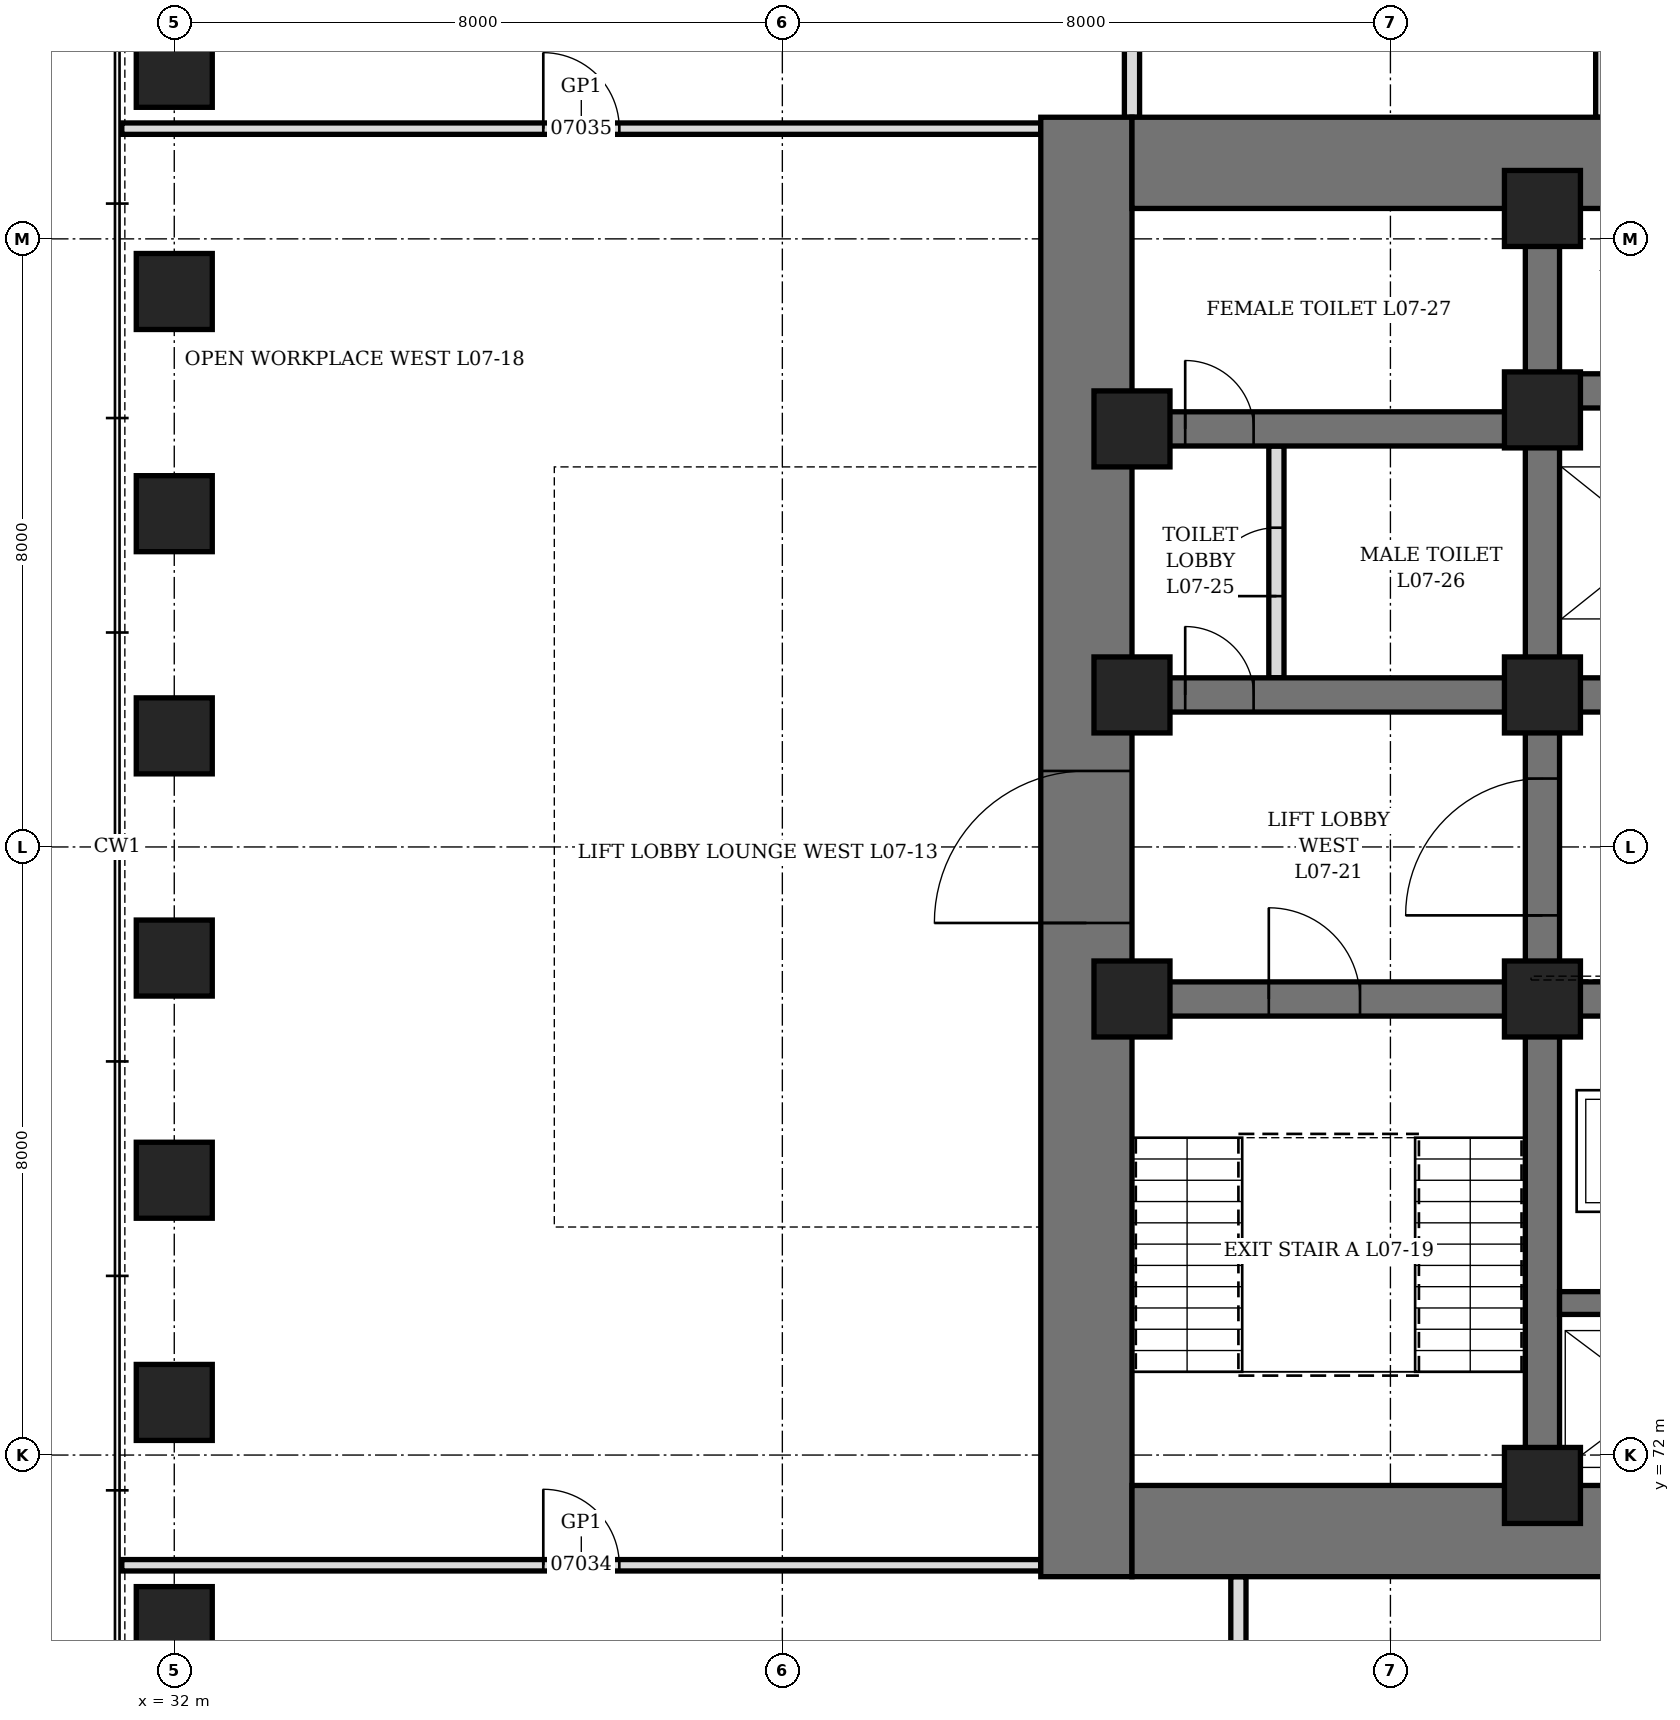
"""IFC4 building model, lengths in metres.
Left out: names, types, materials, properties, quantities, classifications, styles, units other than length and angle.
Written with IfcOpenShell. Run it as: python <this file> out.ifc"""

import sys

from ifc_helpers import new_model, si_unit, direction, frame, frame_2d, origin, origin_2d, place, context, subcontext, project, spatial, rectangle, hollow_rectangle, extrude, element, fill, save


model = new_model("IFC4")
c1 = context("Model", 3, precision=1e-05, world=origin(), true_north=direction((0.0, 1.0)))
c2 = subcontext(c1, "Body", "Model", "MODEL_VIEW")
j1 = project(units=[si_unit("LENGTHUNIT", "METRE"), si_unit("PLANEANGLEUNIT", "RADIAN")], contexts=[c1])
p1 = place(None, origin())
s1 = spatial("IfcSite", under=j1, at=p1, CompositionType="ELEMENT")
p2 = place(p1, origin())
s2 = spatial("IfcBuilding", under=s1, at=p2, CompositionType="ELEMENT")
p3 = place(p2, frame((0.0, 0.0, 39.1)))
s3 = spatial("IfcBuildingStorey", under=s2, at=p3, CompositionType="ELEMENT", Elevation=39.1)
for number, where, z_axis, x_axis in (
    (1, (32.0, 90.231, 0.0), (0.0, 0.0, 1.0), (0.0, 1.0, 0.0)),
    (2, (32.0, 87.308, 0.0), (0.0, 0.0, 1.0), (0.0, 1.0, 0.0)),
    (3, (32.0, 84.385, 0.0), (0.0, 0.0, 1.0), (0.0, 1.0, 0.0)),
    (4, (32.0, 81.461, 0.0), (0.0, 0.0, 1.0), (0.0, 1.0, 0.0)),
    (5, (32.0, 78.539, 0.0), (0.0, 0.0, 1.0), (0.0, 1.0, 0.0)),
    (6, (32.0, 75.615, 0.0), (0.0, 0.0, 1.0), (0.0, 1.0, 0.0)),
    (7, (32.0, 72.692, 0.0), (0.0, 0.0, 1.0), (0.0, 1.0, 0.0)),
    (8, (32.0, 69.769, 0.0), (0.0, 0.0, 1.0), (0.0, 1.0, 0.0)),
):
    element("IfcColumn", number, at=place(p3, frame(where, z_axis=z_axis, x_axis=x_axis)), inside=s3, PredefinedType="COLUMN", context=c2, shape_type="SweptSolid", body=[
        extrude(hollow_rectangle(XDim=1.0, YDim=1.0, WallThickness=0.35, at=origin_2d()), origin(), (0.0, 0.0, 1.0), 4.2),
    ])
p4 = place(p3, frame((44.0, 70.4, 0.0), z_axis=(0.0, 0.0, 1.0), x_axis=(0.0, 1.0, 0.0)))
e9 = element("IfcWall", 9, at=p4, inside=s3, PredefinedType="SHEAR", context=c2, shape_type="SweptSolid", body=[
    extrude(rectangle(XDim=19.2, YDim=1.2, at=frame_2d((9.6, 0.0))), origin(), (0.0, 0.0, 1.0), 4.2),
])
p5 = place(p4, frame((8.6, 0.0, 0.0)))
e10 = element("IfcOpeningElement", 10, at=p5, cuts=e9, PredefinedType="OPENING", context=c2, shape_type="SweptSolid", body=[
    extrude(rectangle(XDim=2.0, YDim=2.4, at=frame_2d((1.0, 1.2))), frame((0.0, 0.61, 0.0), z_axis=(0.0, -1.0, 0.0), x_axis=(1.0, 0.0, 0.0)), (0.0, 0.0, 1.0), 1.22),
])
p6 = place(p3, frame((44.6, 71.0, 0.0), z_axis=(0.0, 0.0, 1.0), x_axis=(1.0, 0.0, 0.0)))
e11 = element("IfcWall", 11, at=p6, inside=s3, PredefinedType="SHEAR", context=c2, shape_type="SweptSolid", body=[
    extrude(rectangle(XDim=22.8, YDim=1.2, at=frame_2d((11.4, 0.0))), origin(), (0.0, 0.0, 1.0), 4.2),
])
p7 = place(p3, frame((44.6, 89.0, 0.0), z_axis=(0.0, 0.0, 1.0), x_axis=(1.0, 0.0, 0.0)))
e12 = element("IfcWall", 12, at=p7, inside=s3, PredefinedType="SHEAR", context=c2, shape_type="SweptSolid", body=[
    extrude(rectangle(XDim=22.8, YDim=1.2, at=frame_2d((11.4, 0.0))), origin(), (0.0, 0.0, 1.0), 4.2),
])
p8 = place(p7, frame((6.525, 0.0, 0.0)))
e13 = element("IfcOpeningElement", 13, at=p8, cuts=e12, PredefinedType="OPENING", context=c2, shape_type="SweptSolid", body=[
    extrude(rectangle(XDim=1.0, YDim=2.1, at=frame_2d((0.5, 1.05))), frame((0.0, 0.61, 0.0), z_axis=(0.0, -1.0, 0.0), x_axis=(1.0, 0.0, 0.0)), (0.0, 0.0, 1.0), 1.22),
])
p9 = place(p7, frame((9.45, 0.0, 0.0)))
e14 = element("IfcOpeningElement", 14, at=p9, cuts=e12, PredefinedType="OPENING", context=c2, shape_type="SweptSolid", body=[
    extrude(rectangle(XDim=0.9, YDim=2.1, at=frame_2d((0.45, 1.05))), frame((0.0, 0.61, 0.0), z_axis=(0.0, -1.0, 0.0), x_axis=(1.0, 0.0, 0.0)), (0.0, 0.0, 1.0), 1.22),
])
p10 = place(p7, frame((12.025, 0.0, 0.0)))
e15 = element("IfcOpeningElement", 15, at=p10, cuts=e12, PredefinedType="OPENING", context=c2, shape_type="SweptSolid", body=[
    extrude(rectangle(XDim=0.9, YDim=2.1, at=frame_2d((0.45, 1.05))), frame((0.0, 0.61, 0.0), z_axis=(0.0, -1.0, 0.0), x_axis=(1.0, 0.0, 0.0)), (0.0, 0.0, 1.0), 1.22),
])
p11 = place(p7, frame((13.962, 0.0, 0.0)))
e16 = element("IfcOpeningElement", 16, at=p11, cuts=e12, PredefinedType="OPENING", context=c2, shape_type="SweptSolid", body=[
    extrude(rectangle(XDim=0.9, YDim=2.1, at=frame_2d((0.45, 1.05))), frame((0.0, 0.61, 0.0), z_axis=(0.0, -1.0, 0.0), x_axis=(1.0, 0.0, 0.0)), (0.0, 0.0, 1.0), 1.22),
])
p12 = place(p3, frame((50.0, 71.6, 0.0), z_axis=(0.0, 0.0, 1.0), x_axis=(0.0, 1.0, 0.0)))
e17 = element("IfcWall", 17, at=p12, inside=s3, PredefinedType="SHEAR", context=c2, shape_type="SweptSolid", body=[
    extrude(rectangle(XDim=16.8, YDim=0.45, at=frame_2d((8.4, 0.0))), origin(), (0.0, 0.0, 1.0), 4.2),
])
p13 = place(p12, frame((7.5, 0.0, 0.0)))
e18 = element("IfcOpeningElement", 18, at=p13, cuts=e17, PredefinedType="OPENING", context=c2, shape_type="SweptSolid", body=[
    extrude(rectangle(XDim=1.8, YDim=2.4, at=frame_2d((0.9, 1.2))), frame((0.0, 0.235, 0.0), z_axis=(0.0, -1.0, 0.0), x_axis=(1.0, 0.0, 0.0)), (0.0, 0.0, 1.0), 0.47),
])
p14 = place(p3, frame((44.6, 78.0, 0.0), z_axis=(0.0, 0.0, 1.0), x_axis=(1.0, 0.0, 0.0)))
e19 = element("IfcWall", 19, at=p14, inside=s3, PredefinedType="SHEAR", context=c2, shape_type="SweptSolid", body=[
    extrude(rectangle(XDim=5.175, YDim=0.45, at=frame_2d((2.587, 0.0))), origin(), (0.0, 0.0, 1.0), 4.2),
])
p15 = place(p14, frame((1.8, 0.0, 0.0)))
e20 = element("IfcOpeningElement", 20, at=p15, cuts=e19, PredefinedType="OPENING", context=c2, shape_type="SweptSolid", body=[
    extrude(rectangle(XDim=1.2, YDim=2.1, at=frame_2d((0.6, 1.05))), frame((0.0, 0.235, 0.0), z_axis=(0.0, -1.0, 0.0), x_axis=(1.0, 0.0, 0.0)), (0.0, 0.0, 1.0), 0.47),
])
p16 = place(p3, frame((44.6, 82.0, 0.0), z_axis=(0.0, 0.0, 1.0), x_axis=(1.0, 0.0, 0.0)))
e21 = element("IfcWall", 21, at=p16, inside=s3, PredefinedType="SHEAR", context=c2, shape_type="SweptSolid", body=[
    extrude(rectangle(XDim=5.175, YDim=0.45, at=frame_2d((2.587, 0.0))), origin(), (0.0, 0.0, 1.0), 4.2),
])
p17 = place(p16, frame((0.7, 0.0, 0.0)))
e22 = element("IfcOpeningElement", 22, at=p17, cuts=e21, PredefinedType="OPENING", context=c2, shape_type="SweptSolid", body=[
    extrude(rectangle(XDim=0.9, YDim=2.1, at=frame_2d((0.45, 1.05))), frame((0.0, 0.235, 0.0), z_axis=(0.0, -1.0, 0.0), x_axis=(1.0, 0.0, 0.0)), (0.0, 0.0, 1.0), 0.47),
])
p18 = place(p3, frame((44.6, 85.5, 0.0), z_axis=(0.0, 0.0, 1.0), x_axis=(1.0, 0.0, 0.0)))
e23 = element("IfcWall", 23, at=p18, inside=s3, PredefinedType="SHEAR", context=c2, shape_type="SweptSolid", body=[
    extrude(rectangle(XDim=5.175, YDim=0.45, at=frame_2d((2.587, 0.0))), origin(), (0.0, 0.0, 1.0), 4.2),
])
p19 = place(p18, frame((0.7, 0.0, 0.0)))
e24 = element("IfcOpeningElement", 24, at=p19, cuts=e23, PredefinedType="OPENING", context=c2, shape_type="SweptSolid", body=[
    extrude(rectangle(XDim=0.9, YDim=2.1, at=frame_2d((0.45, 1.05))), frame((0.0, 0.235, 0.0), z_axis=(0.0, -1.0, 0.0), x_axis=(1.0, 0.0, 0.0)), (0.0, 0.0, 1.0), 0.47),
])
p20 = place(p3, frame((50.225, 78.0, 0.0), z_axis=(0.0, 0.0, 1.0), x_axis=(1.0, 0.0, 0.0)))
e25 = element("IfcWall", 25, at=p20, inside=s3, PredefinedType="SHEAR", context=c2, shape_type="SweptSolid", body=[
    extrude(rectangle(XDim=11.55, YDim=0.45, at=frame_2d((5.775, 0.0))), origin(), (0.0, 0.0, 1.0), 4.2),
])
p21 = place(p20, frame((0.725, 0.0, 0.0)))
e26 = element("IfcOpeningElement", 26, at=p21, cuts=e25, PredefinedType="OPENING", context=c2, shape_type="SweptSolid", body=[
    extrude(rectangle(XDim=1.1, YDim=2.2, at=frame_2d((0.55, 1.1))), frame((0.0, 0.235, 0.0), z_axis=(0.0, -1.0, 0.0), x_axis=(1.0, 0.0, 0.0)), (0.0, 0.0, 1.0), 0.47),
])
p22 = place(p20, frame((3.725, 0.0, 0.0)))
e27 = element("IfcOpeningElement", 27, at=p22, cuts=e25, PredefinedType="OPENING", context=c2, shape_type="SweptSolid", body=[
    extrude(rectangle(XDim=1.1, YDim=2.2, at=frame_2d((0.55, 1.1))), frame((0.0, 0.235, 0.0), z_axis=(0.0, -1.0, 0.0), x_axis=(1.0, 0.0, 0.0)), (0.0, 0.0, 1.0), 0.47),
])
p23 = place(p20, frame((6.725, 0.0, 0.0)))
e28 = element("IfcOpeningElement", 28, at=p23, cuts=e25, PredefinedType="OPENING", context=c2, shape_type="SweptSolid", body=[
    extrude(rectangle(XDim=1.1, YDim=2.2, at=frame_2d((0.55, 1.1))), frame((0.0, 0.235, 0.0), z_axis=(0.0, -1.0, 0.0), x_axis=(1.0, 0.0, 0.0)), (0.0, 0.0, 1.0), 0.47),
])
p24 = place(p20, frame((9.725, 0.0, 0.0)))
e29 = element("IfcOpeningElement", 29, at=p24, cuts=e25, PredefinedType="OPENING", context=c2, shape_type="SweptSolid", body=[
    extrude(rectangle(XDim=1.1, YDim=2.2, at=frame_2d((0.55, 1.1))), frame((0.0, 0.235, 0.0), z_axis=(0.0, -1.0, 0.0), x_axis=(1.0, 0.0, 0.0)), (0.0, 0.0, 1.0), 0.47),
])
for number, where, z_axis, x_axis in (
    (30, (50.225, 82.0, 0.0), (0.0, 0.0, 1.0), (1.0, 0.0, 0.0)),
    (31, (50.225, 86.0, 0.0), (0.0, 0.0, 1.0), (1.0, 0.0, 0.0)),
):
    element("IfcWall", number, at=place(p3, frame(where, z_axis=z_axis, x_axis=x_axis)), inside=s3, PredefinedType="SHEAR", context=c2, shape_type="SweptSolid", body=[
        extrude(rectangle(XDim=11.55, YDim=0.45, at=frame_2d((5.775, 0.0))), origin(), (0.0, 0.0, 1.0), 4.2),
    ])
p25 = place(p3, frame((50.225, 74.0, 0.0), z_axis=(0.0, 0.0, 1.0), x_axis=(1.0, 0.0, 0.0)))
e32 = element("IfcWall", 32, at=p25, inside=s3, PredefinedType="SHEAR", context=c2, shape_type="SweptSolid", body=[
    extrude(rectangle(XDim=11.55, YDim=0.3, at=frame_2d((5.775, 0.0))), origin(), (0.0, 0.0, 1.0), 4.2),
])
for number, where, z_axis, x_axis in (
    (33, (44.6, 78.0, 0.0), (0.0, 0.0, 1.0), (1.0, 0.0, 0.0)),
    (34, (44.6, 82.0, 0.0), (0.0, 0.0, 1.0), (1.0, 0.0, 0.0)),
    (35, (44.6, 85.5, 0.0), (0.0, 0.0, 1.0), (1.0, 0.0, 0.0)),
    (36, (50.0, 71.6, 0.0), (0.0, 0.0, 1.0), (1.0, 0.0, 0.0)),
    (37, (50.0, 78.0, 0.0), (0.0, 0.0, 1.0), (1.0, 0.0, 0.0)),
    (38, (50.0, 82.0, 0.0), (0.0, 0.0, 1.0), (1.0, 0.0, 0.0)),
    (39, (50.0, 85.75, 0.0), (0.0, 0.0, 1.0), (1.0, 0.0, 0.0)),
    (40, (50.0, 88.4, 0.0), (0.0, 0.0, 1.0), (1.0, 0.0, 0.0)),
):
    element("IfcColumn", number, at=place(p3, frame(where, z_axis=z_axis, x_axis=x_axis)), inside=s3, PredefinedType="COLUMN", context=c2, shape_type="SweptSolid", body=[
        extrude(hollow_rectangle(XDim=1.0, YDim=1.0, WallThickness=0.15, at=origin_2d()), origin(), (0.0, 0.0, 1.0), 4.2),
    ])
p26 = place(p3, frame((46.5, 82.225, 0.0), z_axis=(0.0, 0.0, 1.0), x_axis=(0.0, 1.0, 0.0)))
e41 = element("IfcWall", 41, at=p26, inside=s3, PredefinedType="PARTITIONING", context=c2, shape_type="SweptSolid", body=[
    extrude(rectangle(XDim=3.05, YDim=0.2, at=frame_2d((1.525, 0.0))), origin(), (0.0, 0.0, 1.0), 4.04),
])
p27 = place(p26, frame((1.075, 0.0, 0.0)))
e42 = element("IfcOpeningElement", 42, at=p27, cuts=e41, PredefinedType="OPENING", context=c2, shape_type="SweptSolid", body=[
    extrude(rectangle(XDim=0.9, YDim=2.1, at=frame_2d((0.45, 1.05))), frame((0.0, 0.11, 0.0), z_axis=(0.0, -1.0, 0.0), x_axis=(1.0, 0.0, 0.0)), (0.0, 0.0, 1.0), 0.22),
])
p28 = place(p3, frame((46.0, 66.8, 0.0), z_axis=(0.0, 0.0, 1.0), x_axis=(0.0, 1.0, 0.0)))
e43 = element("IfcWall", 43, at=p28, inside=s3, PredefinedType="PARTITIONING", context=c2, shape_type="SweptSolid", body=[
    extrude(rectangle(XDim=3.6, YDim=0.2, at=frame_2d((1.8, 0.0))), origin(), (0.0, 0.0, 1.0), 4.04),
])
for number, where, z_axis, x_axis in (
    (44, (44.6, 89.6, 0.0), (0.0, 0.0, 1.0), (0.0, 1.0, 0.0)),
    (45, (50.8, 89.6, 0.0), (0.0, 0.0, 1.0), (0.0, 1.0, 0.0)),
):
    element("IfcWall", number, at=place(p3, frame(where, z_axis=z_axis, x_axis=x_axis)), inside=s3, PredefinedType="PARTITIONING", context=c2, shape_type="SweptSolid", body=[
        extrude(rectangle(XDim=3.0, YDim=0.2, at=frame_2d((1.5, 0.0))), origin(), (0.0, 0.0, 1.0), 4.04),
    ])
p29 = place(p3, frame((31.31, 70.55, 0.0), z_axis=(0.0, 0.0, 1.0), x_axis=(1.0, 0.0, 0.0)))
e46 = element("IfcWall", 46, at=p29, inside=s3, PredefinedType="PARTITIONING", context=c2, shape_type="SweptSolid", body=[
    extrude(rectangle(XDim=12.09, YDim=0.15, at=frame_2d((6.045, 0.0))), origin(), (0.0, 0.0, 1.0), 4.04),
])
p30 = place(p29, frame((5.545, 0.0, 0.0)))
e47 = element("IfcOpeningElement", 47, at=p30, cuts=e46, PredefinedType="OPENING", context=c2, shape_type="SweptSolid", body=[
    extrude(rectangle(XDim=1.0, YDim=2.4, at=frame_2d((0.5, 1.2))), frame((0.0, 0.085, 0.0), z_axis=(0.0, -1.0, 0.0), x_axis=(1.0, 0.0, 0.0)), (0.0, 0.0, 1.0), 0.17),
])
p31 = place(p3, frame((31.31, 89.45, 0.0), z_axis=(0.0, 0.0, 1.0), x_axis=(1.0, 0.0, 0.0)))
e48 = element("IfcWall", 48, at=p31, inside=s3, PredefinedType="PARTITIONING", context=c2, shape_type="SweptSolid", body=[
    extrude(rectangle(XDim=12.09, YDim=0.15, at=frame_2d((6.045, 0.0))), origin(), (0.0, 0.0, 1.0), 4.04),
])
p32 = place(p31, frame((5.545, 0.0, 0.0)))
e49 = element("IfcOpeningElement", 49, at=p32, cuts=e48, PredefinedType="OPENING", context=c2, shape_type="SweptSolid", body=[
    extrude(rectangle(XDim=1.0, YDim=2.4, at=frame_2d((0.5, 1.2))), frame((0.0, 0.085, 0.0), z_axis=(0.0, -1.0, 0.0), x_axis=(1.0, 0.0, 0.0)), (0.0, 0.0, 1.0), 0.17),
])
p33 = place(p17, origin())
e50 = element("IfcDoor", 50, at=p33, inside=s3, OperationType="SINGLE_SWING_LEFT", PredefinedType="DOOR", context=c2, shape_type="SweptSolid", body=[
    extrude(rectangle(XDim=0.9, YDim=2.1, at=frame_2d((0.45, 1.05))), frame((0.0, 0.225, 0.0), z_axis=(0.0, -1.0, 0.0), x_axis=(1.0, 0.0, 0.0)), (0.0, 0.0, 1.0), 0.449),
])
fill(e22, e50)
p34 = place(p27, origin())
e51 = element("IfcDoor", 51, at=p34, inside=s3, OperationType="SINGLE_SWING_RIGHT", PredefinedType="DOOR", context=c2, shape_type="SweptSolid", body=[
    extrude(rectangle(XDim=0.9, YDim=2.1, at=frame_2d((0.45, 1.05))), frame((0.0, 0.1, 0.0), z_axis=(0.0, -1.0, 0.0), x_axis=(1.0, 0.0, 0.0)), (0.0, 0.0, 1.0), 0.199),
])
fill(e42, e51)
p35 = place(p19, origin())
e52 = element("IfcDoor", 52, at=p35, inside=s3, OperationType="SINGLE_SWING_RIGHT", PredefinedType="DOOR", context=c2, shape_type="SweptSolid", body=[
    extrude(rectangle(XDim=0.9, YDim=2.1, at=frame_2d((0.45, 1.05))), frame((0.0, 0.225, 0.0), z_axis=(0.0, -1.0, 0.0), x_axis=(1.0, 0.0, 0.0)), (0.0, 0.0, 1.0), 0.449),
])
fill(e24, e52)
p36 = place(p15, origin())
e53 = element("IfcDoor", 53, at=p36, inside=s3, OperationType="SINGLE_SWING_LEFT", PredefinedType="DOOR", context=c2, shape_type="SweptSolid", body=[
    extrude(rectangle(XDim=1.2, YDim=2.1, at=frame_2d((0.6, 1.05))), frame((0.0, 0.225, 0.0), z_axis=(0.0, -1.0, 0.0), x_axis=(1.0, 0.0, 0.0)), (0.0, 0.0, 1.0), 0.449),
])
fill(e20, e53)
p37 = place(p5, origin())
e54 = element("IfcDoor", 54, at=p37, inside=s3, OperationType="DOUBLE_DOOR_SINGLE_SWING", PredefinedType="DOOR", context=c2, shape_type="SweptSolid", body=[
    extrude(rectangle(XDim=2.0, YDim=2.4, at=frame_2d((1.0, 1.2))), frame((0.0, 0.35, 0.0), z_axis=(0.0, -1.0, 0.0), x_axis=(1.0, 0.0, 0.0)), (0.0, 0.0, 1.0), 0.7),
])
fill(e10, e54)
p38 = place(p13, origin())
e55 = element("IfcDoor", 55, at=p38, inside=s3, OperationType="DOUBLE_DOOR_SINGLE_SWING", PredefinedType="DOOR", context=c2, shape_type="SweptSolid", body=[
    extrude(rectangle(XDim=1.8, YDim=2.4, at=frame_2d((0.9, 1.2))), frame((0.0, 0.225, 0.0), z_axis=(0.0, -1.0, 0.0), x_axis=(1.0, 0.0, 0.0)), (0.0, 0.0, 1.0), 0.449),
])
fill(e18, e55)
p39 = place(p30, origin())
e56 = element("IfcDoor", 56, at=p39, inside=s3, OperationType="SINGLE_SWING_RIGHT", PredefinedType="DOOR", context=c2, shape_type="SweptSolid", body=[
    extrude(rectangle(XDim=1.0, YDim=2.4, at=frame_2d((0.5, 1.2))), frame((0.0, 0.075, 0.0), z_axis=(0.0, -1.0, 0.0), x_axis=(1.0, 0.0, 0.0)), (0.0, 0.0, 1.0), 0.149),
])
fill(e47, e56)
p40 = place(p32, origin())
e57 = element("IfcDoor", 57, at=p40, inside=s3, OperationType="SINGLE_SWING_RIGHT", PredefinedType="DOOR", context=c2, shape_type="SweptSolid", body=[
    extrude(rectangle(XDim=1.0, YDim=2.4, at=frame_2d((0.5, 1.2))), frame((0.0, 0.075, 0.0), z_axis=(0.0, -1.0, 0.0), x_axis=(1.0, 0.0, 0.0)), (0.0, 0.0, 1.0), 0.149),
])
fill(e49, e57)
save(model, sys.argv[1])
